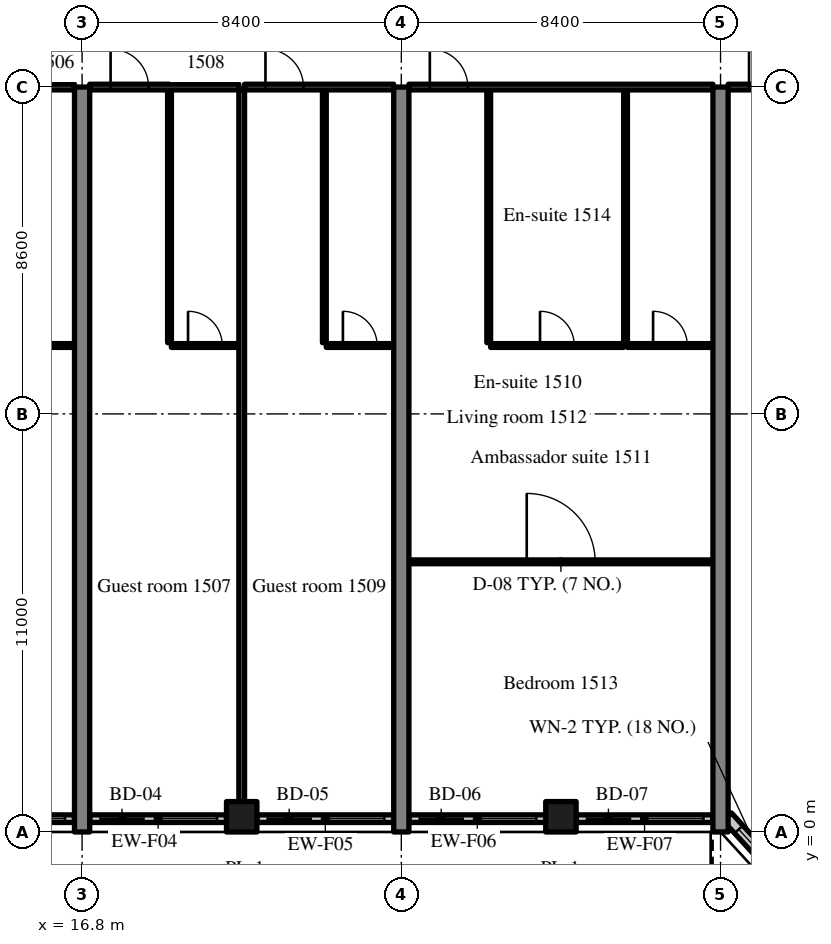
"""IFC4 building model, lengths in metres.
Left out: names, types, materials, properties, quantities, classifications, styles, units other than length and angle.
Written with IfcOpenShell. Run it as: python <this file> out.ifc"""

import sys

from ifc_helpers import new_model, si_unit, direction, frame, frame_2d, origin, origin_2d, place, context, subcontext, project, spatial, rectangle, extrude, source, transform, mapped, element, fill, save


model = new_model("IFC4")
c1 = context("Model", 3, precision=1e-05, world=origin(), true_north=direction((0.0, 1.0)))
c2 = subcontext(c1, "Body", "Model", "MODEL_VIEW")
j1 = project(units=[si_unit("LENGTHUNIT", "METRE"), si_unit("PLANEANGLEUNIT", "RADIAN")], contexts=[c1])
p1 = place(None, origin())
s1 = spatial("IfcSite", under=j1, at=p1, CompositionType="ELEMENT")
p2 = place(p1, origin())
s2 = spatial("IfcBuilding", under=s1, at=p2, CompositionType="ELEMENT")
p3 = place(p2, frame((0.0, 0.0, 65.8)))
s3 = spatial("IfcBuildingStorey", under=s2, at=p3, CompositionType="ELEMENT", Elevation=65.8)
m1 = source(origin(), c2, "Body", "SweptSolid", [
    extrude(rectangle(XDim=19.6, YDim=0.4, at=frame_2d((9.8, 0.0))), origin(), (0.0, 0.0, 1.0), 3.52),
])
for number, where, z_axis, x_axis in (
    (1, (16.8, 0.0, 0.0), (0.0, 0.0, 1.0), (0.0, 1.0, 0.0)),
    (2, (25.2, 0.0, 0.0), (0.0, 0.0, 1.0), (0.0, 1.0, 0.0)),
    (3, (33.6, 0.0, 0.0), (0.0, 0.0, 1.0), (0.0, 1.0, 0.0)),
):
    element("IfcWall", number, at=place(p3, frame(where, z_axis=z_axis, x_axis=x_axis)), inside=s3, PredefinedType="SHEAR", context=c2, shape_type="MappedRepresentation", body=[
        mapped(m1, transform((0.0, 0.0, 0.0), scale=1.0)),
    ])
m2 = source(origin(), c2, "Body", "SweptSolid", [
    extrude(rectangle(XDim=0.8, YDim=0.8, at=origin_2d()), origin(), (0.0, 0.0, 1.0), 3.52),
])
for number, where, z_axis, x_axis in (
    (4, (21.0, 0.4, 0.0), (0.0, 0.0, 1.0), (1.0, 0.0, 0.0)),
    (5, (29.4, 0.4, 0.0), (0.0, 0.0, 1.0), (1.0, 0.0, 0.0)),
):
    element("IfcColumn", number, at=place(p3, frame(where, z_axis=z_axis, x_axis=x_axis)), inside=s3, PredefinedType="COLUMN", context=c2, shape_type="MappedRepresentation", body=[
        mapped(m2, transform((0.0, 0.0, 0.0), scale=1.0)),
    ])
m3 = source(origin(), c2, "Body", "SweptSolid", [
    extrude(rectangle(XDim=3.6, YDim=0.2, at=frame_2d((1.8, 0.0))), origin(), (0.0, 0.0, 1.0), 2.82),
])
p4 = place(p3, frame((13.0, 0.35, 0.0), z_axis=(0.0, 0.0, 1.0), x_axis=(1.0, 0.0, 0.0)))
e6 = element("IfcWall", 6, at=p4, inside=s3, PredefinedType="SOLIDWALL", context=c2, shape_type="MappedRepresentation", body=[
    mapped(m3, transform((0.0, 0.0, 0.0), scale=1.0)),
])
m4 = source(origin(), c2, "Body", "SweptSolid", [
    extrude(rectangle(XDim=1.2, YDim=2.4, at=frame_2d((0.6, 1.2))), frame((0.0, 0.11, 0.0), z_axis=(0.0, -1.0, 0.0), x_axis=(1.0, 0.0, 0.0)), (0.0, 0.0, 1.0), 0.22),
])
p5 = place(p4, frame((0.25, 0.0, 0.0)))
e7 = element("IfcOpeningElement", 7, at=p5, cuts=e6, PredefinedType="OPENING", context=c2, shape_type="MappedRepresentation", body=[
    mapped(m4, transform((0.0, 0.0, 0.0), scale=1.0)),
])
m5 = source(origin(), c2, "Body", "SweptSolid", [
    extrude(rectangle(XDim=1.5, YDim=1.5, at=frame_2d((0.75, 0.75))), frame((0.0, 0.11, 0.0), z_axis=(0.0, -1.0, 0.0), x_axis=(1.0, 0.0, 0.0)), (0.0, 0.0, 1.0), 0.22),
])
p6 = place(p4, frame((1.85, 0.0, 0.9)))
e8 = element("IfcOpeningElement", 8, at=p6, cuts=e6, PredefinedType="OPENING", context=c2, shape_type="MappedRepresentation", body=[
    mapped(m5, transform((0.0, 0.0, 0.0), scale=1.0)),
])
p7 = place(p3, frame((17.0, 0.35, 0.0), z_axis=(0.0, 0.0, 1.0), x_axis=(1.0, 0.0, 0.0)))
e9 = element("IfcWall", 9, at=p7, inside=s3, PredefinedType="SOLIDWALL", context=c2, shape_type="MappedRepresentation", body=[
    mapped(m3, transform((0.0, 0.0, 0.0), scale=1.0)),
])
p8 = place(p7, frame((0.25, 0.0, 0.0)))
e10 = element("IfcOpeningElement", 10, at=p8, cuts=e9, PredefinedType="OPENING", context=c2, shape_type="MappedRepresentation", body=[
    mapped(m4, transform((0.0, 0.0, 0.0), scale=1.0)),
])
p9 = place(p7, frame((1.85, 0.0, 0.9)))
e11 = element("IfcOpeningElement", 11, at=p9, cuts=e9, PredefinedType="OPENING", context=c2, shape_type="MappedRepresentation", body=[
    mapped(m5, transform((0.0, 0.0, 0.0), scale=1.0)),
])
p10 = place(p3, frame((21.4, 0.35, 0.0), z_axis=(0.0, 0.0, 1.0), x_axis=(1.0, 0.0, 0.0)))
e12 = element("IfcWall", 12, at=p10, inside=s3, PredefinedType="SOLIDWALL", context=c2, shape_type="MappedRepresentation", body=[
    mapped(m3, transform((0.0, 0.0, 0.0), scale=1.0)),
])
p11 = place(p10, frame((0.25, 0.0, 0.0)))
e13 = element("IfcOpeningElement", 13, at=p11, cuts=e12, PredefinedType="OPENING", context=c2, shape_type="MappedRepresentation", body=[
    mapped(m4, transform((0.0, 0.0, 0.0), scale=1.0)),
])
p12 = place(p10, frame((1.85, 0.0, 0.9)))
e14 = element("IfcOpeningElement", 14, at=p12, cuts=e12, PredefinedType="OPENING", context=c2, shape_type="MappedRepresentation", body=[
    mapped(m5, transform((0.0, 0.0, 0.0), scale=1.0)),
])
p13 = place(p3, frame((25.4, 0.35, 0.0), z_axis=(0.0, 0.0, 1.0), x_axis=(1.0, 0.0, 0.0)))
e15 = element("IfcWall", 15, at=p13, inside=s3, PredefinedType="SOLIDWALL", context=c2, shape_type="MappedRepresentation", body=[
    mapped(m3, transform((0.0, 0.0, 0.0), scale=1.0)),
])
p14 = place(p13, frame((0.25, 0.0, 0.0)))
e16 = element("IfcOpeningElement", 16, at=p14, cuts=e15, PredefinedType="OPENING", context=c2, shape_type="MappedRepresentation", body=[
    mapped(m4, transform((0.0, 0.0, 0.0), scale=1.0)),
])
p15 = place(p13, frame((1.85, 0.0, 0.9)))
e17 = element("IfcOpeningElement", 17, at=p15, cuts=e15, PredefinedType="OPENING", context=c2, shape_type="MappedRepresentation", body=[
    mapped(m5, transform((0.0, 0.0, 0.0), scale=1.0)),
])
m6 = source(origin(), c2, "Body", "SweptSolid", [
    extrude(rectangle(XDim=3.6, YDim=0.2, at=frame_2d((1.8, 0.0))), origin(), (0.0, 0.0, 1.0), 2.82),
])
p16 = place(p3, frame((29.8, 0.35, 0.0), z_axis=(0.0, 0.0, 1.0), x_axis=(1.0, 0.0, 0.0)))
e18 = element("IfcWall", 18, at=p16, inside=s3, PredefinedType="SOLIDWALL", context=c2, shape_type="MappedRepresentation", body=[
    mapped(m6, transform((0.0, 0.0, 0.0), scale=1.0)),
])
p17 = place(p16, frame((0.25, 0.0, 0.0)))
e19 = element("IfcOpeningElement", 19, at=p17, cuts=e18, PredefinedType="OPENING", context=c2, shape_type="MappedRepresentation", body=[
    mapped(m4, transform((0.0, 0.0, 0.0), scale=1.0)),
])
p18 = place(p16, frame((1.85, 0.0, 0.9)))
e20 = element("IfcOpeningElement", 20, at=p18, cuts=e18, PredefinedType="OPENING", context=c2, shape_type="MappedRepresentation", body=[
    mapped(m5, transform((0.0, 0.0, 0.0), scale=1.0)),
])
m7 = source(origin(), c2, "Body", "SweptSolid", [
    extrude(rectangle(XDim=2.398, YDim=0.3, at=frame_2d((1.199, 0.0))), origin(), (0.0, 0.0, 1.0), 3.52),
])
p19 = place(p3, frame((33.776, 0.4, 0.0), z_axis=(0.0, 0.0, 1.0), x_axis=(0.675374189419, -0.737475222815, 0.0)))
e21 = element("IfcWall", 21, at=p19, inside=s3, PredefinedType="SOLIDWALL", context=c2, shape_type="MappedRepresentation", body=[
    mapped(m7, transform((0.0, 0.0, 0.0), scale=1.0)),
])
m8 = source(origin(), c2, "Body", "SweptSolid", [
    extrude(rectangle(XDim=1.5, YDim=2.0, at=frame_2d((0.75, 1.0))), frame((0.0, 0.16, 0.0), z_axis=(0.0, -1.0, 0.0), x_axis=(1.0, 0.0, 0.0)), (0.0, 0.0, 1.0), 0.32),
])
p20 = place(p19, frame((0.449, 0.0, 0.9)))
e22 = element("IfcOpeningElement", 22, at=p20, cuts=e21, PredefinedType="OPENING", context=c2, shape_type="MappedRepresentation", body=[
    mapped(m8, transform((0.0, 0.0, 0.0), scale=1.0)),
])
m9 = source(origin(), c2, "Body", "SweptSolid", [
    extrude(rectangle(XDim=2.25, YDim=0.1, at=frame_2d((1.125, 0.0))), origin(), (0.0, 0.0, 1.0), 3.52),
])
p21 = place(p3, frame((14.35, 12.8, 0.0), z_axis=(0.0, 0.0, 1.0), x_axis=(1.0, 0.0, 0.0)))
e23 = element("IfcWall", 23, at=p21, inside=s3, PredefinedType="PARTITIONING", context=c2, shape_type="MappedRepresentation", body=[
    mapped(m9, transform((0.0, 0.0, 0.0), scale=1.0)),
])
m10 = source(origin(), c2, "Body", "SweptSolid", [
    extrude(rectangle(XDim=0.9, YDim=2.1, at=frame_2d((0.45, 1.05))), frame((0.0, 0.06, 0.0), z_axis=(0.0, -1.0, 0.0), x_axis=(1.0, 0.0, 0.0)), (0.0, 0.0, 1.0), 0.12),
])
p22 = place(p21, frame((0.675, 0.0, 0.0)))
e24 = element("IfcOpeningElement", 24, at=p22, cuts=e23, PredefinedType="OPENING", context=c2, shape_type="MappedRepresentation", body=[
    mapped(m10, transform((0.0, 0.0, 0.0), scale=1.0)),
])
m11 = source(origin(), c2, "Body", "SweptSolid", [
    extrude(rectangle(XDim=8.0, YDim=0.15, at=frame_2d((4.0, 0.0))), origin(), (0.0, 0.0, 1.0), 2.82),
])
p23 = place(p3, frame((8.6, 19.6, 0.0), z_axis=(0.0, 0.0, 1.0), x_axis=(1.0, 0.0, 0.0)))
e25 = element("IfcWall", 25, at=p23, inside=s3, PredefinedType="PARTITIONING", context=c2, shape_type="MappedRepresentation", body=[
    mapped(m11, transform((0.0, 0.0, 0.0), scale=1.0)),
])
m12 = source(origin(), c2, "Body", "SweptSolid", [
    extrude(rectangle(XDim=1.0, YDim=2.1, at=frame_2d((0.5, 1.05))), frame((0.0, 0.085, 0.0), z_axis=(0.0, -1.0, 0.0), x_axis=(1.0, 0.0, 0.0)), (0.0, 0.0, 1.0), 0.17),
])
p24 = place(p23, frame((0.55, 0.0, 0.0)))
e26 = element("IfcOpeningElement", 26, at=p24, cuts=e25, PredefinedType="OPENING", context=c2, shape_type="MappedRepresentation", body=[
    mapped(m12, transform((0.0, 0.0, 0.0), scale=1.0)),
])
m13 = source(origin(), c2, "Body", "SweptSolid", [
    extrude(rectangle(XDim=6.65, YDim=0.1, at=frame_2d((3.325, 0.0))), origin(), (0.0, 0.0, 1.0), 3.52),
])
p25 = place(p3, frame((19.1, 12.875, 0.0), z_axis=(0.0, 0.0, 1.0), x_axis=(0.0, 1.0, 0.0)))
e27 = element("IfcWall", 27, at=p25, inside=s3, PredefinedType="PARTITIONING", context=c2, shape_type="MappedRepresentation", body=[
    mapped(m13, transform((0.0, 0.0, 0.0), scale=1.0)),
])
m14 = source(origin(), c2, "Body", "SweptSolid", [
    extrude(rectangle(XDim=1.775, YDim=0.1, at=frame_2d((0.888, 0.0))), origin(), (0.0, 0.0, 1.0), 3.52),
])
p26 = place(p3, frame((19.15, 12.8, 0.0), z_axis=(0.0, 0.0, 1.0), x_axis=(1.0, 0.0, 0.0)))
e28 = element("IfcWall", 28, at=p26, inside=s3, PredefinedType="PARTITIONING", context=c2, shape_type="MappedRepresentation", body=[
    mapped(m14, transform((0.0, 0.0, 0.0), scale=1.0)),
])
p27 = place(p26, frame((0.438, 0.0, 0.0)))
e29 = element("IfcOpeningElement", 29, at=p27, cuts=e28, PredefinedType="OPENING", context=c2, shape_type="MappedRepresentation", body=[
    mapped(m10, transform((0.0, 0.0, 0.0), scale=1.0)),
])
m15 = source(origin(), c2, "Body", "SweptSolid", [
    extrude(rectangle(XDim=3.925, YDim=0.15, at=frame_2d((1.962, 0.0))), origin(), (0.0, 0.0, 1.0), 2.82),
])
p28 = place(p3, frame((17.0, 19.6, 0.0), z_axis=(0.0, 0.0, 1.0), x_axis=(1.0, 0.0, 0.0)))
e30 = element("IfcWall", 30, at=p28, inside=s3, PredefinedType="PARTITIONING", context=c2, shape_type="MappedRepresentation", body=[
    mapped(m15, transform((0.0, 0.0, 0.0), scale=1.0)),
])
p29 = place(p28, frame((0.55, 0.0, 0.0)))
e31 = element("IfcOpeningElement", 31, at=p29, cuts=e30, PredefinedType="OPENING", context=c2, shape_type="MappedRepresentation", body=[
    mapped(m12, transform((0.0, 0.0, 0.0), scale=1.0)),
])
p30 = place(p3, frame((23.175, 12.875, 0.0), z_axis=(0.0, 0.0, 1.0), x_axis=(0.0, 1.0, 0.0)))
e32 = element("IfcWall", 32, at=p30, inside=s3, PredefinedType="PARTITIONING", context=c2, shape_type="MappedRepresentation", body=[
    mapped(m13, transform((0.0, 0.0, 0.0), scale=1.0)),
])
m16 = source(origin(), c2, "Body", "SweptSolid", [
    extrude(rectangle(XDim=1.775, YDim=0.1, at=frame_2d((0.887, 0.0))), origin(), (0.0, 0.0, 1.0), 3.52),
])
p31 = place(p3, frame((23.225, 12.8, 0.0), z_axis=(0.0, 0.0, 1.0), x_axis=(1.0, 0.0, 0.0)))
e33 = element("IfcWall", 33, at=p31, inside=s3, PredefinedType="PARTITIONING", context=c2, shape_type="MappedRepresentation", body=[
    mapped(m16, transform((0.0, 0.0, 0.0), scale=1.0)),
])
p32 = place(p31, frame((0.438, 0.0, 0.0)))
e34 = element("IfcOpeningElement", 34, at=p32, cuts=e33, PredefinedType="OPENING", context=c2, shape_type="MappedRepresentation", body=[
    mapped(m10, transform((0.0, 0.0, 0.0), scale=1.0)),
])
p33 = place(p3, frame((21.075, 19.6, 0.0), z_axis=(0.0, 0.0, 1.0), x_axis=(1.0, 0.0, 0.0)))
e35 = element("IfcWall", 35, at=p33, inside=s3, PredefinedType="PARTITIONING", context=c2, shape_type="MappedRepresentation", body=[
    mapped(m15, transform((0.0, 0.0, 0.0), scale=1.0)),
])
p34 = place(p33, frame((0.55, 0.0, 0.0)))
e36 = element("IfcOpeningElement", 36, at=p34, cuts=e35, PredefinedType="OPENING", context=c2, shape_type="MappedRepresentation", body=[
    mapped(m12, transform((0.0, 0.0, 0.0), scale=1.0)),
])
m17 = source(origin(), c2, "Body", "SweptSolid", [
    extrude(rectangle(XDim=18.725, YDim=0.15, at=frame_2d((9.362, 0.0))), origin(), (0.0, 0.0, 1.0), 3.52),
])
p35 = place(p3, frame((21.0, 0.8, 0.0), z_axis=(0.0, 0.0, 1.0), x_axis=(0.0, 1.0, 0.0)))
e37 = element("IfcWall", 37, at=p35, inside=s3, PredefinedType="PARTITIONING", context=c2, shape_type="MappedRepresentation", body=[
    mapped(m17, transform((0.0, 0.0, 0.0), scale=1.0)),
])
for number, where, z_axis, x_axis in (
    (38, (27.5, 12.875, 0.0), (0.0, 0.0, 1.0), (0.0, 1.0, 0.0)),
    (39, (31.1, 12.875, 0.0), (0.0, 0.0, 1.0), (0.0, 1.0, 0.0)),
):
    element("IfcWall", number, at=place(p3, frame(where, z_axis=z_axis, x_axis=x_axis)), inside=s3, PredefinedType="PARTITIONING", context=c2, shape_type="MappedRepresentation", body=[
        mapped(m13, transform((0.0, 0.0, 0.0), scale=1.0)),
    ])
m18 = source(origin(), c2, "Body", "SweptSolid", [
    extrude(rectangle(XDim=3.5, YDim=0.1, at=frame_2d((1.75, 0.0))), origin(), (0.0, 0.0, 1.0), 3.52),
])
p36 = place(p3, frame((27.55, 12.8, 0.0), z_axis=(0.0, 0.0, 1.0), x_axis=(1.0, 0.0, 0.0)))
e40 = element("IfcWall", 40, at=p36, inside=s3, PredefinedType="PARTITIONING", context=c2, shape_type="MappedRepresentation", body=[
    mapped(m18, transform((0.0, 0.0, 0.0), scale=1.0)),
])
p37 = place(p36, frame((1.3, 0.0, 0.0)))
e41 = element("IfcOpeningElement", 41, at=p37, cuts=e40, PredefinedType="OPENING", context=c2, shape_type="MappedRepresentation", body=[
    mapped(m10, transform((0.0, 0.0, 0.0), scale=1.0)),
])
p38 = place(p3, frame((31.15, 12.8, 0.0), z_axis=(0.0, 0.0, 1.0), x_axis=(1.0, 0.0, 0.0)))
e42 = element("IfcWall", 42, at=p38, inside=s3, PredefinedType="PARTITIONING", context=c2, shape_type="MappedRepresentation", body=[
    mapped(m9, transform((0.0, 0.0, 0.0), scale=1.0)),
])
p39 = place(p38, frame((0.675, 0.0, 0.0)))
e43 = element("IfcOpeningElement", 43, at=p39, cuts=e42, PredefinedType="OPENING", context=c2, shape_type="MappedRepresentation", body=[
    mapped(m10, transform((0.0, 0.0, 0.0), scale=1.0)),
])
m19 = source(origin(), c2, "Body", "SweptSolid", [
    extrude(rectangle(XDim=8.0, YDim=0.1, at=frame_2d((4.0, 0.0))), origin(), (0.0, 0.0, 1.0), 3.52),
])
p40 = place(p3, frame((25.4, 7.108, 0.0), z_axis=(0.0, 0.0, 1.0), x_axis=(1.0, 0.0, 0.0)))
e44 = element("IfcWall", 44, at=p40, inside=s3, PredefinedType="PARTITIONING", context=c2, shape_type="MappedRepresentation", body=[
    mapped(m19, transform((0.0, 0.0, 0.0), scale=1.0)),
])
m20 = source(origin(), c2, "Body", "SweptSolid", [
    extrude(rectangle(XDim=1.8, YDim=2.1, at=frame_2d((0.9, 1.05))), frame((0.0, 0.06, 0.0), z_axis=(0.0, -1.0, 0.0), x_axis=(1.0, 0.0, 0.0)), (0.0, 0.0, 1.0), 0.12),
])
p41 = place(p40, frame((3.1, 0.0, 0.0)))
e45 = element("IfcOpeningElement", 45, at=p41, cuts=e44, PredefinedType="OPENING", context=c2, shape_type="MappedRepresentation", body=[
    mapped(m20, transform((0.0, 0.0, 0.0), scale=1.0)),
])
p42 = place(p3, frame((25.4, 19.6, 0.0), z_axis=(0.0, 0.0, 1.0), x_axis=(1.0, 0.0, 0.0)))
e46 = element("IfcWall", 46, at=p42, inside=s3, PredefinedType="PARTITIONING", context=c2, shape_type="MappedRepresentation", body=[
    mapped(m11, transform((0.0, 0.0, 0.0), scale=1.0)),
])
p43 = place(p42, frame((0.55, 0.0, 0.0)))
e47 = element("IfcOpeningElement", 47, at=p43, cuts=e46, PredefinedType="OPENING", context=c2, shape_type="MappedRepresentation", body=[
    mapped(m12, transform((0.0, 0.0, 0.0), scale=1.0)),
])
p44 = place(p3, frame((33.8, 19.6, 0.0), z_axis=(0.0, 0.0, 1.0), x_axis=(1.0, 0.0, 0.0)))
e48 = element("IfcWall", 48, at=p44, inside=s3, PredefinedType="PARTITIONING", context=c2, shape_type="MappedRepresentation", body=[
    mapped(m11, transform((0.0, 0.0, 0.0), scale=1.0)),
])
p45 = place(p44, frame((0.55, 0.0, 0.0)))
e49 = element("IfcOpeningElement", 49, at=p45, cuts=e48, PredefinedType="OPENING", context=c2, shape_type="MappedRepresentation", body=[
    mapped(m12, transform((0.0, 0.0, 0.0), scale=1.0)),
])
m21 = source(origin(), c2, "Body", "SweptSolid", [
    extrude(rectangle(XDim=1.5, YDim=1.5, at=frame_2d((0.75, 0.75))), frame((0.0, 0.03, 0.0), z_axis=(0.0, -1.0, 0.0), x_axis=(1.0, 0.0, 0.0)), (0.0, 0.0, 1.0), 0.06),
])
p46 = place(p6, origin())
e50 = element("IfcWindow", 50, at=p46, inside=s3, PartitioningType="SINGLE_PANEL", PredefinedType="WINDOW", context=c2, shape_type="MappedRepresentation", body=[
    mapped(m21, transform((0.0, 0.0, 0.0), scale=1.0)),
])
fill(e8, e50)
m22 = source(origin(), c2, "Body", "SweptSolid", [
    extrude(rectangle(XDim=1.2, YDim=2.4, at=frame_2d((0.6, 1.2))), frame((0.0, 0.025, 0.0), z_axis=(0.0, -1.0, 0.0), x_axis=(1.0, 0.0, 0.0)), (0.0, 0.0, 1.0), 0.05),
])
p47 = place(p8, origin())
e51 = element("IfcDoor", 51, at=p47, inside=s3, OperationType="SLIDING_TO_RIGHT", PredefinedType="DOOR", context=c2, shape_type="MappedRepresentation", body=[
    mapped(m22, transform((0.0, 0.0, 0.0), scale=1.0)),
])
fill(e10, e51)
p48 = place(p9, origin())
e52 = element("IfcWindow", 52, at=p48, inside=s3, PartitioningType="SINGLE_PANEL", PredefinedType="WINDOW", context=c2, shape_type="MappedRepresentation", body=[
    mapped(m21, transform((0.0, 0.0, 0.0), scale=1.0)),
])
fill(e11, e52)
p49 = place(p11, origin())
e53 = element("IfcDoor", 53, at=p49, inside=s3, OperationType="SLIDING_TO_LEFT", PredefinedType="DOOR", context=c2, shape_type="MappedRepresentation", body=[
    mapped(m22, transform((0.0, 0.0, 0.0), scale=1.0)),
])
fill(e13, e53)
p50 = place(p12, origin())
e54 = element("IfcWindow", 54, at=p50, inside=s3, PartitioningType="SINGLE_PANEL", PredefinedType="WINDOW", context=c2, shape_type="MappedRepresentation", body=[
    mapped(m21, transform((0.0, 0.0, 0.0), scale=1.0)),
])
fill(e14, e54)
p51 = place(p14, origin())
e55 = element("IfcDoor", 55, at=p51, inside=s3, OperationType="SLIDING_TO_RIGHT", PredefinedType="DOOR", context=c2, shape_type="MappedRepresentation", body=[
    mapped(m22, transform((0.0, 0.0, 0.0), scale=1.0)),
])
fill(e16, e55)
p52 = place(p15, origin())
e56 = element("IfcWindow", 56, at=p52, inside=s3, PartitioningType="SINGLE_PANEL", PredefinedType="WINDOW", context=c2, shape_type="MappedRepresentation", body=[
    mapped(m21, transform((0.0, 0.0, 0.0), scale=1.0)),
])
fill(e17, e56)
p53 = place(p17, origin())
e57 = element("IfcDoor", 57, at=p53, inside=s3, OperationType="SLIDING_TO_LEFT", PredefinedType="DOOR", context=c2, shape_type="MappedRepresentation", body=[
    mapped(m22, transform((0.0, 0.0, 0.0), scale=1.0)),
])
fill(e19, e57)
p54 = place(p18, origin())
e58 = element("IfcWindow", 58, at=p54, inside=s3, PartitioningType="SINGLE_PANEL", PredefinedType="WINDOW", context=c2, shape_type="MappedRepresentation", body=[
    mapped(m21, transform((0.0, 0.0, 0.0), scale=1.0)),
])
fill(e20, e58)
m23 = source(origin(), c2, "Body", "SweptSolid", [
    extrude(rectangle(XDim=1.5, YDim=2.0, at=frame_2d((0.75, 1.0))), frame((0.0, 0.03, 0.0), z_axis=(0.0, -1.0, 0.0), x_axis=(1.0, 0.0, 0.0)), (0.0, 0.0, 1.0), 0.06),
])
p55 = place(p20, origin())
e59 = element("IfcWindow", 59, at=p55, inside=s3, PartitioningType="SINGLE_PANEL", PredefinedType="WINDOW", context=c2, shape_type="MappedRepresentation", body=[
    mapped(m23, transform((0.0, 0.0, 0.0), scale=1.0)),
])
fill(e22, e59)
m24 = source(origin(), c2, "Body", "SweptSolid", [
    extrude(rectangle(XDim=0.9, YDim=2.1, at=frame_2d((0.45, 1.05))), frame((0.0, 0.025, 0.0), z_axis=(0.0, -1.0, 0.0), x_axis=(1.0, 0.0, 0.0)), (0.0, 0.0, 1.0), 0.05),
])
p56 = place(p27, origin())
e60 = element("IfcDoor", 60, at=p56, inside=s3, OperationType="SINGLE_SWING_LEFT", PredefinedType="DOOR", context=c2, shape_type="MappedRepresentation", body=[
    mapped(m24, transform((0.0, 0.0, 0.0), scale=1.0)),
])
fill(e29, e60)
m25 = source(origin(), c2, "Body", "SweptSolid", [
    extrude(rectangle(XDim=1.0, YDim=2.1, at=frame_2d((0.5, 1.05))), frame((0.0, 0.025, 0.0), z_axis=(0.0, -1.0, 0.0), x_axis=(1.0, 0.0, 0.0)), (0.0, 0.0, 1.0), 0.05),
])
p57 = place(p29, origin())
e61 = element("IfcDoor", 61, at=p57, inside=s3, OperationType="SINGLE_SWING_LEFT", PredefinedType="DOOR", context=c2, shape_type="MappedRepresentation", body=[
    mapped(m25, transform((0.0, 0.0, 0.0), scale=1.0)),
])
fill(e31, e61)
p58 = place(p32, origin())
e62 = element("IfcDoor", 62, at=p58, inside=s3, OperationType="SINGLE_SWING_LEFT", PredefinedType="DOOR", context=c2, shape_type="MappedRepresentation", body=[
    mapped(m24, transform((0.0, 0.0, 0.0), scale=1.0)),
])
fill(e34, e62)
p59 = place(p34, origin())
e63 = element("IfcDoor", 63, at=p59, inside=s3, OperationType="SINGLE_SWING_LEFT", PredefinedType="DOOR", context=c2, shape_type="MappedRepresentation", body=[
    mapped(m25, transform((0.0, 0.0, 0.0), scale=1.0)),
])
fill(e36, e63)
p60 = place(p37, origin())
e64 = element("IfcDoor", 64, at=p60, inside=s3, OperationType="SINGLE_SWING_LEFT", PredefinedType="DOOR", context=c2, shape_type="MappedRepresentation", body=[
    mapped(m24, transform((0.0, 0.0, 0.0), scale=1.0)),
])
fill(e41, e64)
p61 = place(p39, origin())
e65 = element("IfcDoor", 65, at=p61, inside=s3, OperationType="SINGLE_SWING_LEFT", PredefinedType="DOOR", context=c2, shape_type="MappedRepresentation", body=[
    mapped(m24, transform((0.0, 0.0, 0.0), scale=1.0)),
])
fill(e43, e65)
m26 = source(origin(), c2, "Body", "SweptSolid", [
    extrude(rectangle(XDim=1.8, YDim=2.1, at=frame_2d((0.9, 1.05))), frame((0.0, 0.025, 0.0), z_axis=(0.0, -1.0, 0.0), x_axis=(1.0, 0.0, 0.0)), (0.0, 0.0, 1.0), 0.05),
])
p62 = place(p41, origin())
e66 = element("IfcDoor", 66, at=p62, inside=s3, OperationType="DOUBLE_DOOR_SINGLE_SWING", PredefinedType="DOOR", context=c2, shape_type="MappedRepresentation", body=[
    mapped(m26, transform((0.0, 0.0, 0.0), scale=1.0)),
])
fill(e45, e66)
p63 = place(p43, origin())
e67 = element("IfcDoor", 67, at=p63, inside=s3, OperationType="SINGLE_SWING_LEFT", PredefinedType="DOOR", context=c2, shape_type="MappedRepresentation", body=[
    mapped(m25, transform((0.0, 0.0, 0.0), scale=1.0)),
])
fill(e47, e67)
p64 = place(p45, origin())
e68 = element("IfcDoor", 68, at=p64, inside=s3, OperationType="SINGLE_SWING_LEFT", PredefinedType="DOOR", context=c2, shape_type="MappedRepresentation", body=[
    mapped(m25, transform((0.0, 0.0, 0.0), scale=1.0)),
])
fill(e49, e68)
save(model, sys.argv[1])
